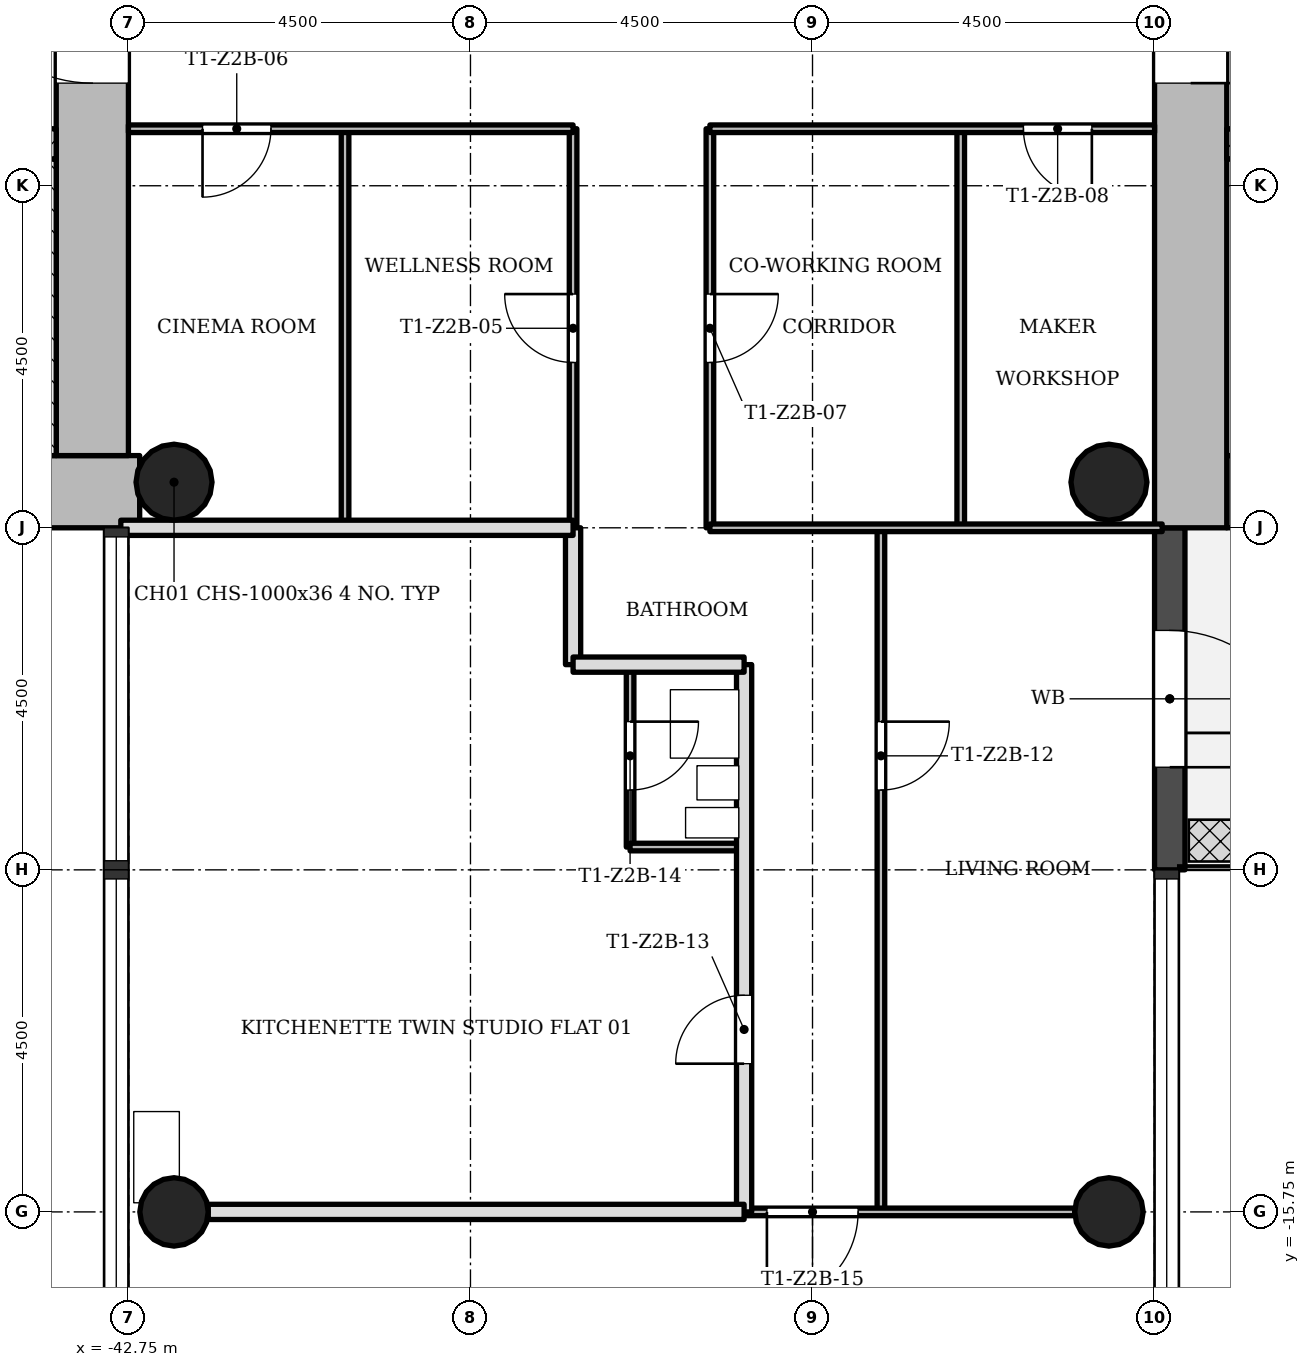
"""IFC4 building model, lengths in metres.
Left out: names, types, materials, properties, quantities, classifications, styles, units other than length and angle.
Written with IfcOpenShell. Run it as: python <this file> out.ifc"""

import sys

from ifc_helpers import new_model, si_unit, direction, frame, frame_2d, origin, origin_2d, place, context, subcontext, project, spatial, rectangle, hollow_circle, extrude, element, fill, save


model = new_model("IFC4")
c1 = context("Model", 3, precision=1e-05, world=origin(), true_north=direction((0.0, 1.0)))
c2 = subcontext(c1, "Body", "Model", "MODEL_VIEW")
j1 = project(units=[si_unit("LENGTHUNIT", "METRE"), si_unit("PLANEANGLEUNIT", "RADIAN")], contexts=[c1])
p1 = place(None, origin())
s1 = spatial("IfcSite", under=j1, at=p1, CompositionType="ELEMENT")
p2 = place(p1, origin())
s2 = spatial("IfcBuilding", under=s1, at=p2, CompositionType="ELEMENT")
p3 = place(p2, frame((0.0, 0.0, 76.6)))
s3 = spatial("IfcBuildingStorey", under=s2, at=p3, CompositionType="ELEMENT", Elevation=76.6)
p4 = place(p3, frame((-28.3, -6.275, 0.0), z_axis=(0.0, 0.0, 1.0), x_axis=(1.0, 0.0, 0.0)))
e1 = element("IfcWall", 1, at=p4, inside=s3, PredefinedType="SHEAR", context=c2, shape_type="SweptSolid", body=[
    extrude(rectangle(XDim=8.05, YDim=0.95, at=frame_2d((4.025, 0.0))), origin(), (0.0, 0.0, 1.0), 3.4),
])
p5 = place(p3, frame((-28.775, 5.8, 0.0), z_axis=(0.0, 0.0, 1.0), x_axis=(0.0, -1.0, 0.0)))
e2 = element("IfcWall", 2, at=p5, inside=s3, PredefinedType="SHEAR", context=c2, shape_type="SweptSolid", body=[
    extrude(rectangle(XDim=12.55, YDim=0.95, at=frame_2d((6.275, 0.0))), origin(), (0.0, 0.0, 1.0), 3.4),
])
p6 = place(p5, frame((4.9, 0.0, 0.0)))
e3 = element("IfcOpeningElement", 3, at=p6, cuts=e2, PredefinedType="OPENING", context=c2, shape_type="SweptSolid", body=[
    extrude(rectangle(XDim=1.8, YDim=2.1, at=frame_2d((0.9, 1.05))), frame((0.0, 0.485, 0.0), z_axis=(0.0, -1.0, 0.0), x_axis=(1.0, 0.0, 0.0)), (0.0, 0.0, 1.0), 0.97),
])
p7 = place(p3, frame((-28.3, -1.7, 0.0), z_axis=(0.0, 0.0, 1.0), x_axis=(1.0, 0.0, 0.0)))
e4 = element("IfcWall", 4, at=p7, inside=s3, PredefinedType="SHEAR", context=c2, shape_type="SweptSolid", body=[
    extrude(rectangle(XDim=7.1, YDim=0.4, at=frame_2d((3.55, 0.0))), origin(), (0.0, 0.0, 1.0), 3.4),
])
p8 = place(p7, frame((0.8, 0.0, 0.0)))
e5 = element("IfcOpeningElement", 5, at=p8, cuts=e4, PredefinedType="OPENING", context=c2, shape_type="SweptSolid", body=[
    extrude(rectangle(XDim=1.1, YDim=2.1, at=frame_2d((0.55, 1.05))), frame((0.0, 0.21, 0.0), z_axis=(0.0, -1.0, 0.0), x_axis=(1.0, 0.0, 0.0)), (0.0, 0.0, 1.0), 0.42),
])
p9 = place(p7, frame((3.0, 0.0, 0.0)))
e6 = element("IfcOpeningElement", 6, at=p9, cuts=e4, PredefinedType="OPENING", context=c2, shape_type="SweptSolid", body=[
    extrude(rectangle(XDim=1.1, YDim=2.1, at=frame_2d((0.55, 1.05))), frame((0.0, 0.21, 0.0), z_axis=(0.0, -1.0, 0.0), x_axis=(1.0, 0.0, 0.0)), (0.0, 0.0, 1.0), 0.42),
])
p10 = place(p7, frame((5.2, 0.0, 0.0)))
e7 = element("IfcOpeningElement", 7, at=p10, cuts=e4, PredefinedType="OPENING", context=c2, shape_type="SweptSolid", body=[
    extrude(rectangle(XDim=1.1, YDim=2.1, at=frame_2d((0.55, 1.05))), frame((0.0, 0.21, 0.0), z_axis=(0.0, -1.0, 0.0), x_axis=(1.0, 0.0, 0.0)), (0.0, 0.0, 1.0), 0.42),
])
p11 = place(p3, frame((-51.298, -6.275, 0.0), z_axis=(0.0, 0.0, 1.0), x_axis=(1.0, 0.0, 0.0)))
e8 = element("IfcWall", 8, at=p11, inside=s3, PredefinedType="SHEAR", context=c2, shape_type="SweptSolid", body=[
    extrude(rectangle(XDim=8.696, YDim=0.95, at=frame_2d((4.348, 0.0))), origin(), (0.0, 0.0, 1.0), 3.4),
])
p12 = place(p3, frame((-43.225, -5.8, 0.0), z_axis=(0.0, 0.0, 1.0), x_axis=(0.0, 1.0, 0.0)))
e9 = element("IfcWall", 9, at=p12, inside=s3, PredefinedType="SHEAR", context=c2, shape_type="SweptSolid", body=[
    extrude(rectangle(XDim=12.55, YDim=0.95, at=frame_2d((6.275, 0.0))), origin(), (0.0, 0.0, 1.0), 3.4),
])
p13 = place(p12, frame((4.9, 0.0, 0.0)))
e10 = element("IfcOpeningElement", 10, at=p13, cuts=e9, PredefinedType="OPENING", context=c2, shape_type="SweptSolid", body=[
    extrude(rectangle(XDim=1.8, YDim=2.1, at=frame_2d((0.9, 1.05))), frame((0.0, 0.485, 0.0), z_axis=(0.0, -1.0, 0.0), x_axis=(1.0, 0.0, 0.0)), (0.0, 0.0, 1.0), 0.97),
])
p14 = place(p3, frame((-50.8, -1.7, 0.0), z_axis=(0.0, 0.0, 1.0), x_axis=(1.0, 0.0, 0.0)))
e11 = element("IfcWall", 11, at=p14, inside=s3, PredefinedType="SHEAR", context=c2, shape_type="SweptSolid", body=[
    extrude(rectangle(XDim=7.1, YDim=0.4, at=frame_2d((3.55, 0.0))), origin(), (0.0, 0.0, 1.0), 3.4),
])
p15 = place(p14, frame((5.5, 0.0, 0.0)))
e12 = element("IfcOpeningElement", 12, at=p15, cuts=e11, PredefinedType="OPENING", context=c2, shape_type="SweptSolid", body=[
    extrude(rectangle(XDim=0.9, YDim=2.1, at=frame_2d((0.45, 1.05))), frame((0.0, 0.21, 0.0), z_axis=(0.0, -1.0, 0.0), x_axis=(1.0, 0.0, 0.0)), (0.0, 0.0, 1.0), 0.42),
])
for number, where, z_axis, x_axis in (
    (13, (-42.15, -15.75, 0.0), (0.0, 0.0, 1.0), (1.0, 0.0, 0.0)),
    (14, (-29.85, -15.75, 0.0), (0.0, 0.0, 1.0), (1.0, 0.0, 0.0)),
):
    element("IfcColumn", number, at=place(p3, frame(where, z_axis=z_axis, x_axis=x_axis)), inside=s3, PredefinedType="COLUMN", context=c2, shape_type="SweptSolid", body=[
        extrude(hollow_circle(Radius=0.45, WallThickness=0.032, at=origin_2d()), origin(), (0.0, 0.0, 1.0), 3.4),
    ])
for number, where, z_axis, x_axis in (
    (15, (-42.15, -6.15, 0.0), (0.0, 0.0, 1.0), (1.0, 0.0, 0.0)),
    (16, (-29.85, -6.15, 0.0), (0.0, 0.0, 1.0), (1.0, 0.0, 0.0)),
):
    element("IfcColumn", number, at=place(p3, frame(where, z_axis=z_axis, x_axis=x_axis)), inside=s3, PredefinedType="COLUMN", context=c2, shape_type="SweptSolid", body=[
        extrude(hollow_circle(Radius=0.5, WallThickness=0.036, at=origin_2d()), origin(), (0.0, 0.0, 1.0), 3.4),
    ])
p16 = place(p3, frame((-29.05, -11.25, -0.02), z_axis=(0.0, 0.0, 1.0), x_axis=(0.0, 1.0, 0.0)))
e17 = element("IfcWall", 17, at=p16, inside=s3, PredefinedType="STANDARD", context=c2, shape_type="SweptSolid", body=[
    extrude(rectangle(XDim=4.5, YDim=0.4, at=frame_2d((2.25, 0.0))), origin(), (0.0, 0.0, 1.0), 3.12),
])
p17 = place(p16, frame((1.35, 0.0, 0.02)))
e18 = element("IfcOpeningElement", 18, at=p17, cuts=e17, PredefinedType="OPENING", context=c2, shape_type="SweptSolid", body=[
    extrude(rectangle(XDim=1.8, YDim=2.1, at=frame_2d((0.9, 1.05))), frame((0.0, 0.21, 0.0), z_axis=(0.0, -1.0, 0.0), x_axis=(1.0, 0.0, 0.0)), (0.0, 0.0, 1.0), 0.42),
])
p18 = place(p3, frame((-39.9, -6.75, 0.0), z_axis=(0.0, 0.0, 1.0), x_axis=(0.0, 1.0, 0.0)))
e19 = element("IfcWall", 19, at=p18, inside=s3, PredefinedType="PARTITIONING", context=c2, shape_type="SweptSolid", body=[
    extrude(rectangle(XDim=5.25, YDim=0.1, at=frame_2d((2.625, 0.0))), origin(), (0.0, 0.0, 1.0), 3.0),
])
p19 = place(p3, frame((-36.9, -6.75, 0.0), z_axis=(0.0, 0.0, 1.0), x_axis=(0.0, 1.0, 0.0)))
e20 = element("IfcWall", 20, at=p19, inside=s3, PredefinedType="PARTITIONING", context=c2, shape_type="SweptSolid", body=[
    extrude(rectangle(XDim=5.25, YDim=0.1, at=frame_2d((2.625, 0.0))), origin(), (0.0, 0.0, 1.0), 3.0),
])
p20 = place(p19, frame((2.175, 0.0, 0.0)))
e21 = element("IfcOpeningElement", 21, at=p20, cuts=e20, PredefinedType="OPENING", context=c2, shape_type="SweptSolid", body=[
    extrude(rectangle(XDim=0.9, YDim=2.1, at=frame_2d((0.45, 1.05))), frame((0.0, 0.06, 0.0), z_axis=(0.0, -1.0, 0.0), x_axis=(1.0, 0.0, 0.0)), (0.0, 0.0, 1.0), 0.12),
])
p21 = place(p3, frame((-36.9, -8.55, 0.0), z_axis=(0.0, 0.0, 1.0), x_axis=(0.0, 1.0, 0.0)))
e22 = element("IfcWall", 22, at=p21, inside=s3, PredefinedType="SOLIDWALL", context=c2, shape_type="SweptSolid", body=[
    extrude(rectangle(XDim=1.8, YDim=0.2, at=frame_2d((0.9, 0.0))), origin(), (0.0, 0.0, 1.0), 3.0),
])
p22 = place(p3, frame((-36.15, -10.95, 0.0), z_axis=(0.0, 0.0, 1.0), x_axis=(0.0, 1.0, 0.0)))
e23 = element("IfcWall", 23, at=p22, inside=s3, PredefinedType="PARTITIONING", context=c2, shape_type="SweptSolid", body=[
    extrude(rectangle(XDim=2.4, YDim=0.1, at=frame_2d((1.2, 0.0))), origin(), (0.0, 0.0, 1.0), 3.0),
])
p23 = place(p22, frame((0.75, 0.0, 0.0)))
e24 = element("IfcOpeningElement", 24, at=p23, cuts=e23, PredefinedType="OPENING", context=c2, shape_type="SweptSolid", body=[
    extrude(rectangle(XDim=0.9, YDim=2.1, at=frame_2d((0.45, 1.05))), frame((0.0, 0.06, 0.0), z_axis=(0.0, -1.0, 0.0), x_axis=(1.0, 0.0, 0.0)), (0.0, 0.0, 1.0), 0.12),
])
p24 = place(p3, frame((-35.1, -6.75, 0.0), z_axis=(0.0, 0.0, 1.0), x_axis=(0.0, 1.0, 0.0)))
e25 = element("IfcWall", 25, at=p24, inside=s3, PredefinedType="PARTITIONING", context=c2, shape_type="SweptSolid", body=[
    extrude(rectangle(XDim=5.25, YDim=0.1, at=frame_2d((2.625, 0.0))), origin(), (0.0, 0.0, 1.0), 3.0),
])
p25 = place(p24, frame((2.175, 0.0, 0.0)))
e26 = element("IfcOpeningElement", 26, at=p25, cuts=e25, PredefinedType="OPENING", context=c2, shape_type="SweptSolid", body=[
    extrude(rectangle(XDim=0.9, YDim=2.1, at=frame_2d((0.45, 1.05))), frame((0.0, 0.06, 0.0), z_axis=(0.0, -1.0, 0.0), x_axis=(1.0, 0.0, 0.0)), (0.0, 0.0, 1.0), 0.12),
])
p26 = place(p3, frame((-34.65, -15.75, 0.0), z_axis=(0.0, 0.0, 1.0), x_axis=(0.0, 1.0, 0.0)))
e27 = element("IfcWall", 27, at=p26, inside=s3, PredefinedType="SOLIDWALL", context=c2, shape_type="SweptSolid", body=[
    extrude(rectangle(XDim=7.2, YDim=0.2, at=frame_2d((3.6, 0.0))), origin(), (0.0, 0.0, 1.0), 3.0),
])
p27 = place(p26, frame((1.95, 0.0, 0.0)))
e28 = element("IfcOpeningElement", 28, at=p27, cuts=e27, PredefinedType="OPENING", context=c2, shape_type="SweptSolid", body=[
    extrude(rectangle(XDim=0.9, YDim=2.1, at=frame_2d((0.45, 1.05))), frame((0.0, 0.11, 0.0), z_axis=(0.0, -1.0, 0.0), x_axis=(1.0, 0.0, 0.0)), (0.0, 0.0, 1.0), 0.22),
])
p28 = place(p3, frame((-32.85, -15.75, 0.0), z_axis=(0.0, 0.0, 1.0), x_axis=(0.0, 1.0, 0.0)))
e29 = element("IfcWall", 29, at=p28, inside=s3, PredefinedType="PARTITIONING", context=c2, shape_type="SweptSolid", body=[
    extrude(rectangle(XDim=9.0, YDim=0.1, at=frame_2d((4.5, 0.0))), origin(), (0.0, 0.0, 1.0), 3.0),
])
p29 = place(p28, frame((5.55, 0.0, 0.0)))
e30 = element("IfcOpeningElement", 30, at=p29, cuts=e29, PredefinedType="OPENING", context=c2, shape_type="SweptSolid", body=[
    extrude(rectangle(XDim=0.9, YDim=2.1, at=frame_2d((0.45, 1.05))), frame((0.0, 0.06, 0.0), z_axis=(0.0, -1.0, 0.0), x_axis=(1.0, 0.0, 0.0)), (0.0, 0.0, 1.0), 0.12),
])
p30 = place(p3, frame((-31.8, -6.75, 0.0), z_axis=(0.0, 0.0, 1.0), x_axis=(0.0, 1.0, 0.0)))
e31 = element("IfcWall", 31, at=p30, inside=s3, PredefinedType="PARTITIONING", context=c2, shape_type="SweptSolid", body=[
    extrude(rectangle(XDim=5.25, YDim=0.1, at=frame_2d((2.625, 0.0))), origin(), (0.0, 0.0, 1.0), 3.0),
])
p31 = place(p3, frame((-34.65, -15.75, 0.0), z_axis=(0.0, 0.0, 1.0), x_axis=(1.0, 0.0, 0.0)))
e32 = element("IfcWall", 32, at=p31, inside=s3, PredefinedType="PARTITIONING", context=c2, shape_type="SweptSolid", body=[
    extrude(rectangle(XDim=4.35, YDim=0.1, at=frame_2d((2.175, 0.0))), origin(), (0.0, 0.0, 1.0), 3.0),
])
p32 = place(p31, frame((0.3, 0.0, 0.0)))
e33 = element("IfcOpeningElement", 33, at=p32, cuts=e32, PredefinedType="OPENING", context=c2, shape_type="SweptSolid", body=[
    extrude(rectangle(XDim=1.2, YDim=2.1, at=frame_2d((0.6, 1.05))), frame((0.0, 0.06, 0.0), z_axis=(0.0, -1.0, 0.0), x_axis=(1.0, 0.0, 0.0)), (0.0, 0.0, 1.0), 0.12),
])
p33 = place(p3, frame((-41.7, -15.75, 0.0), z_axis=(0.0, 0.0, 1.0), x_axis=(1.0, 0.0, 0.0)))
e34 = element("IfcWall", 34, at=p33, inside=s3, PredefinedType="SOLIDWALL", context=c2, shape_type="SweptSolid", body=[
    extrude(rectangle(XDim=7.05, YDim=0.2, at=frame_2d((3.525, 0.0))), origin(), (0.0, 0.0, 1.0), 3.0),
])
p34 = place(p3, frame((-36.15, -10.95, 0.0), z_axis=(0.0, 0.0, 1.0), x_axis=(1.0, 0.0, 0.0)))
e35 = element("IfcWall", 35, at=p34, inside=s3, PredefinedType="PARTITIONING", context=c2, shape_type="SweptSolid", body=[
    extrude(rectangle(XDim=1.5, YDim=0.1, at=frame_2d((0.75, 0.0))), origin(), (0.0, 0.0, 1.0), 3.0),
])
p35 = place(p3, frame((-36.9, -8.55, 0.0), z_axis=(0.0, 0.0, 1.0), x_axis=(1.0, 0.0, 0.0)))
e36 = element("IfcWall", 36, at=p35, inside=s3, PredefinedType="SOLIDWALL", context=c2, shape_type="SweptSolid", body=[
    extrude(rectangle(XDim=2.25, YDim=0.2, at=frame_2d((1.125, 0.0))), origin(), (0.0, 0.0, 1.0), 3.0),
])
p36 = place(p3, frame((-35.1, -6.75, 0.0), z_axis=(0.0, 0.0, 1.0), x_axis=(1.0, 0.0, 0.0)))
e37 = element("IfcWall", 37, at=p36, inside=s3, PredefinedType="PARTITIONING", context=c2, shape_type="SweptSolid", body=[
    extrude(rectangle(XDim=5.95, YDim=0.1, at=frame_2d((2.975, 0.0))), origin(), (0.0, 0.0, 1.0), 3.0),
])
p37 = place(p3, frame((-42.85, -6.75, 0.0), z_axis=(0.0, 0.0, 1.0), x_axis=(1.0, 0.0, 0.0)))
e38 = element("IfcWall", 38, at=p37, inside=s3, PredefinedType="SOLIDWALL", context=c2, shape_type="SweptSolid", body=[
    extrude(rectangle(XDim=5.95, YDim=0.2, at=frame_2d((2.975, 0.0))), origin(), (0.0, 0.0, 1.0), 3.0),
])
p38 = place(p3, frame((-42.75, -1.5, 0.0), z_axis=(0.0, 0.0, 1.0), x_axis=(1.0, 0.0, 0.0)))
e39 = element("IfcWall", 39, at=p38, inside=s3, PredefinedType="PARTITIONING", context=c2, shape_type="SweptSolid", body=[
    extrude(rectangle(XDim=5.85, YDim=0.1, at=frame_2d((2.925, 0.0))), origin(), (0.0, 0.0, 1.0), 3.0),
])
p39 = place(p38, frame((0.975, 0.0, 0.0)))
e40 = element("IfcOpeningElement", 40, at=p39, cuts=e39, PredefinedType="OPENING", context=c2, shape_type="SweptSolid", body=[
    extrude(rectangle(XDim=0.9, YDim=2.1, at=frame_2d((0.45, 1.05))), frame((0.0, 0.06, 0.0), z_axis=(0.0, -1.0, 0.0), x_axis=(1.0, 0.0, 0.0)), (0.0, 0.0, 1.0), 0.12),
])
p40 = place(p3, frame((-35.1, -1.5, 0.0), z_axis=(0.0, 0.0, 1.0), x_axis=(1.0, 0.0, 0.0)))
e41 = element("IfcWall", 41, at=p40, inside=s3, PredefinedType="PARTITIONING", context=c2, shape_type="SweptSolid", body=[
    extrude(rectangle(XDim=5.85, YDim=0.1, at=frame_2d((2.925, 0.0))), origin(), (0.0, 0.0, 1.0), 3.0),
])
p41 = place(p40, frame((4.125, 0.0, 0.0)))
e42 = element("IfcOpeningElement", 42, at=p41, cuts=e41, PredefinedType="OPENING", context=c2, shape_type="SweptSolid", body=[
    extrude(rectangle(XDim=0.9, YDim=2.1, at=frame_2d((0.45, 1.05))), frame((0.0, 0.06, 0.0), z_axis=(0.0, -1.0, 0.0), x_axis=(1.0, 0.0, 0.0)), (0.0, 0.0, 1.0), 0.12),
])
p42 = place(p3, frame((-43.825, -1.9, 0.0), z_axis=(0.0, 0.0, 1.0), x_axis=(0.0, -1.0, 0.0)))
e43 = element("IfcWall", 43, at=p42, inside=s3, PredefinedType="SHEAR", context=c2, shape_type="SweptSolid", body=[
    extrude(rectangle(XDim=3.9, YDim=0.25, at=frame_2d((1.95, 0.0))), origin(), (0.0, 0.0, 1.0), 3.4),
])
p43 = place(p17, origin())
e44 = element("IfcDoor", 44, at=p43, inside=s3, OperationType="SINGLE_SWING_LEFT", PredefinedType="DOOR", context=c2, shape_type="SweptSolid", body=[
    extrude(rectangle(XDim=1.8, YDim=2.1, at=frame_2d((0.9, 1.05))), frame((0.0, 0.025, 0.0), z_axis=(0.0, -1.0, 0.0), x_axis=(1.0, 0.0, 0.0)), (0.0, 0.0, 1.0), 0.05),
])
fill(e18, e44)
p44 = place(p20, origin())
e45 = element("IfcDoor", 45, at=p44, inside=s3, OperationType="SINGLE_SWING_LEFT", PredefinedType="DOOR", context=c2, shape_type="SweptSolid", body=[
    extrude(rectangle(XDim=0.9, YDim=2.1, at=frame_2d((0.45, 1.05))), frame((0.0, 0.025, 0.0), z_axis=(0.0, -1.0, 0.0), x_axis=(1.0, 0.0, 0.0)), (0.0, 0.0, 1.0), 0.05),
])
fill(e21, e45)
p45 = place(p39, origin())
e46 = element("IfcDoor", 46, at=p45, inside=s3, OperationType="SINGLE_SWING_LEFT", PredefinedType="DOOR", context=c2, shape_type="SweptSolid", body=[
    extrude(rectangle(XDim=0.9, YDim=2.1, at=frame_2d((0.45, 1.05))), frame((0.0, 0.025, 0.0), z_axis=(0.0, -1.0, 0.0), x_axis=(1.0, 0.0, 0.0)), (0.0, 0.0, 1.0), 0.05),
])
fill(e40, e46)
p46 = place(p25, origin())
e47 = element("IfcDoor", 47, at=p46, inside=s3, OperationType="SINGLE_SWING_RIGHT", PredefinedType="DOOR", context=c2, shape_type="SweptSolid", body=[
    extrude(rectangle(XDim=0.9, YDim=2.1, at=frame_2d((0.45, 1.05))), frame((0.0, 0.025, 0.0), z_axis=(0.0, -1.0, 0.0), x_axis=(1.0, 0.0, 0.0)), (0.0, 0.0, 1.0), 0.05),
])
fill(e26, e47)
p47 = place(p41, origin())
e48 = element("IfcDoor", 48, at=p47, inside=s3, OperationType="SINGLE_SWING_RIGHT", PredefinedType="DOOR", context=c2, shape_type="SweptSolid", body=[
    extrude(rectangle(XDim=0.9, YDim=2.1, at=frame_2d((0.45, 1.05))), frame((0.0, 0.025, 0.0), z_axis=(0.0, -1.0, 0.0), x_axis=(1.0, 0.0, 0.0)), (0.0, 0.0, 1.0), 0.05),
])
fill(e42, e48)
p48 = place(p29, origin())
e49 = element("IfcDoor", 49, at=p48, inside=s3, OperationType="SINGLE_SWING_RIGHT", PredefinedType="DOOR", context=c2, shape_type="SweptSolid", body=[
    extrude(rectangle(XDim=0.9, YDim=2.1, at=frame_2d((0.45, 1.05))), frame((0.0, 0.025, 0.0), z_axis=(0.0, -1.0, 0.0), x_axis=(1.0, 0.0, 0.0)), (0.0, 0.0, 1.0), 0.05),
])
fill(e30, e49)
p49 = place(p27, origin())
e50 = element("IfcDoor", 50, at=p49, inside=s3, OperationType="SINGLE_SWING_RIGHT", PredefinedType="DOOR", context=c2, shape_type="SweptSolid", body=[
    extrude(rectangle(XDim=0.9, YDim=2.1, at=frame_2d((0.45, 1.05))), frame((0.0, 0.025, 0.0), z_axis=(0.0, -1.0, 0.0), x_axis=(1.0, 0.0, 0.0)), (0.0, 0.0, 1.0), 0.05),
])
fill(e28, e50)
p50 = place(p23, origin())
e51 = element("IfcDoor", 51, at=p50, inside=s3, OperationType="SINGLE_SWING_RIGHT", PredefinedType="DOOR", context=c2, shape_type="SweptSolid", body=[
    extrude(rectangle(XDim=0.9, YDim=2.1, at=frame_2d((0.45, 1.05))), frame((0.0, 0.025, 0.0), z_axis=(0.0, -1.0, 0.0), x_axis=(1.0, 0.0, 0.0)), (0.0, 0.0, 1.0), 0.05),
])
fill(e24, e51)
p51 = place(p32, origin())
e52 = element("IfcDoor", 52, at=p51, inside=s3, OperationType="SINGLE_SWING_LEFT", PredefinedType="DOOR", context=c2, shape_type="SweptSolid", body=[
    extrude(rectangle(XDim=1.2, YDim=2.1, at=frame_2d((0.6, 1.05))), frame((0.0, 0.025, 0.0), z_axis=(0.0, -1.0, 0.0), x_axis=(1.0, 0.0, 0.0)), (0.0, 0.0, 1.0), 0.05),
])
fill(e33, e52)
p52 = place(p6, origin())
e53 = element("IfcDoor", 53, at=p52, inside=s3, OperationType="SINGLE_SWING_LEFT", PredefinedType="DOOR", context=c2, shape_type="SweptSolid", body=[
    extrude(rectangle(XDim=1.8, YDim=2.1, at=frame_2d((0.9, 1.05))), frame((0.0, 0.025, 0.0), z_axis=(0.0, -1.0, 0.0), x_axis=(1.0, 0.0, 0.0)), (0.0, 0.0, 1.0), 0.05),
])
fill(e3, e53)
p53 = place(p13, origin())
e54 = element("IfcDoor", 54, at=p53, inside=s3, OperationType="SINGLE_SWING_LEFT", PredefinedType="DOOR", context=c2, shape_type="SweptSolid", body=[
    extrude(rectangle(XDim=1.8, YDim=2.1, at=frame_2d((0.9, 1.05))), frame((0.0, 0.025, 0.0), z_axis=(0.0, -1.0, 0.0), x_axis=(1.0, 0.0, 0.0)), (0.0, 0.0, 1.0), 0.05),
])
fill(e10, e54)
save(model, sys.argv[1])
